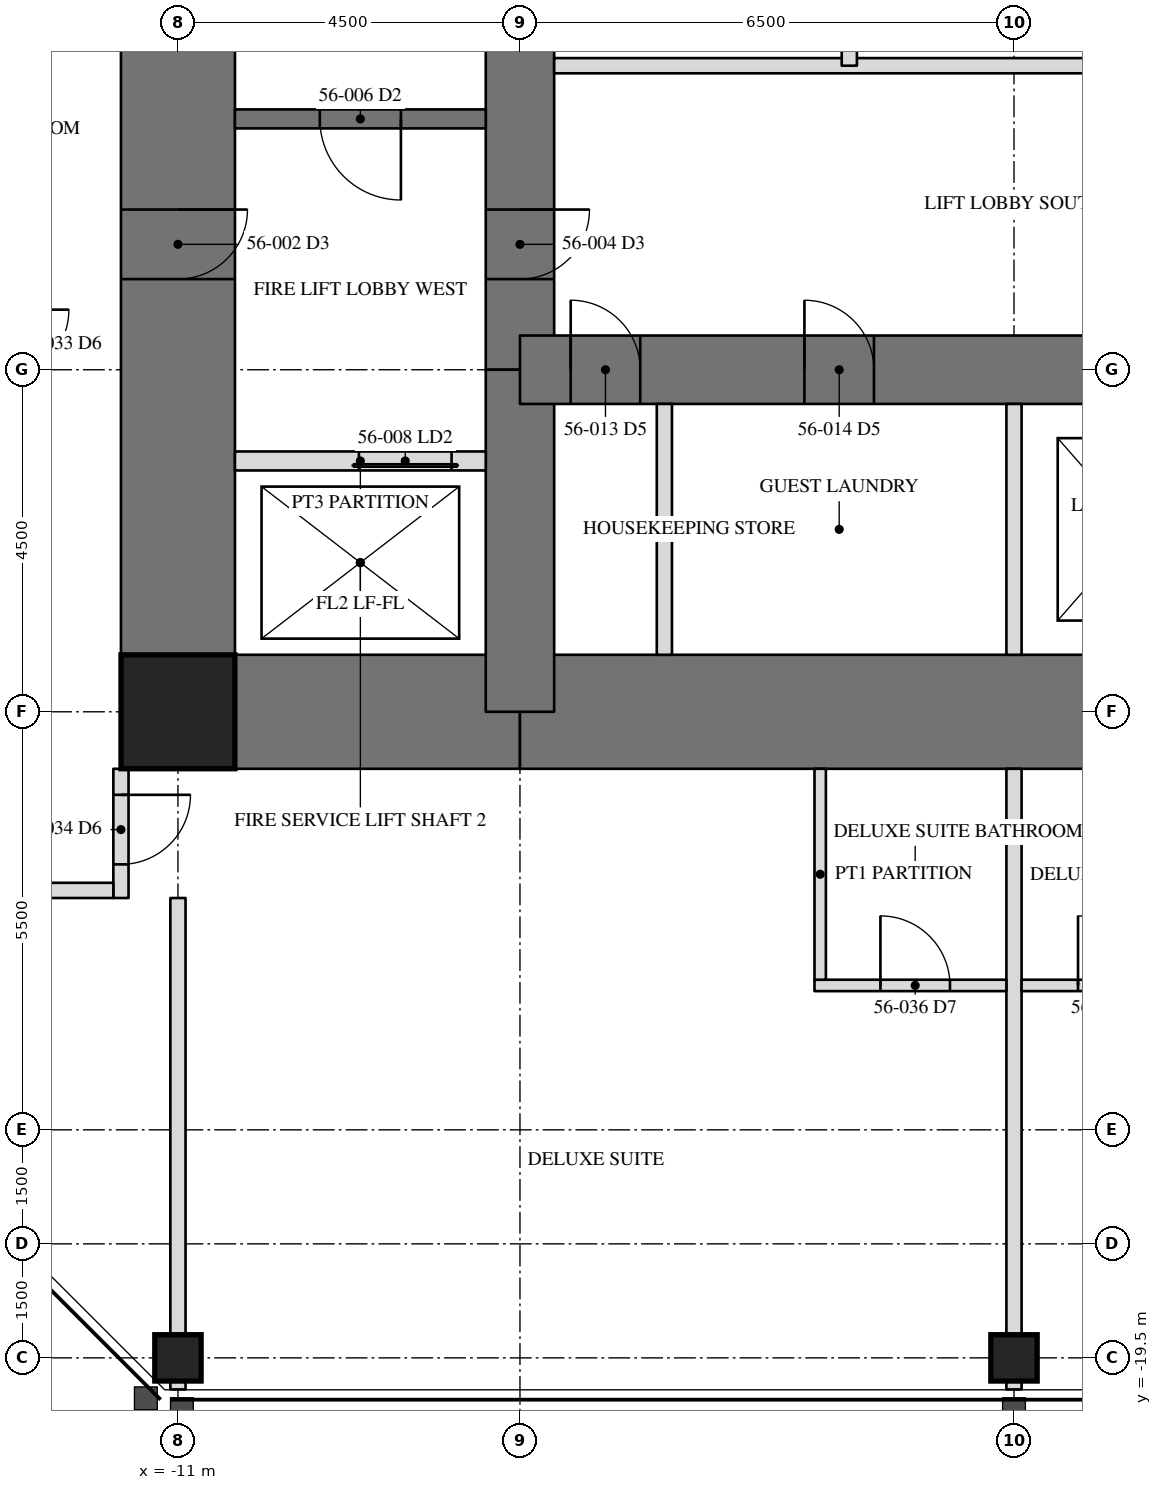
"""IFC4 building model, lengths in metres.
Left out: names, types, materials, properties, quantities, classifications, styles, units other than length and angle.
Written with IfcOpenShell. Run it as: python <this file> out.ifc"""

import sys

from ifc_helpers import new_model, si_unit, direction, frame, frame_2d, origin, origin_2d, place, context, subcontext, project, spatial, rectangle, hollow_rectangle, extrude, element, fill, save


model = new_model("IFC4")
c1 = context("Model", 3, precision=1e-05, world=origin(), true_north=direction((0.0, 1.0)))
c2 = subcontext(c1, "Body", "Model", "MODEL_VIEW")
j1 = project(units=[si_unit("LENGTHUNIT", "METRE"), si_unit("PLANEANGLEUNIT", "RADIAN")], contexts=[c1])
p1 = place(None, origin())
s1 = spatial("IfcSite", under=j1, at=p1, CompositionType="ELEMENT")
p2 = place(p1, origin())
s2 = spatial("IfcBuilding", under=s1, at=p2, CompositionType="ELEMENT")
p3 = place(p2, frame((0.0, 0.0, 232.7)))
s3 = spatial("IfcBuildingStorey", under=s2, at=p3, CompositionType="ELEMENT", Elevation=232.7)
for number, where, z_axis, x_axis in (
    (1, (-11.0, -19.5, 0.0), (0.0, 0.0, 1.0), (1.0, 0.0, 0.0)),
    (2, (0.0, -19.5, 0.0), (0.0, 0.0, 1.0), (1.0, 0.0, 0.0)),
):
    element("IfcColumn", number, at=place(p3, frame(where, z_axis=z_axis, x_axis=x_axis)), inside=s3, PredefinedType="COLUMN", context=c2, shape_type="SweptSolid", body=[
        extrude(hollow_rectangle(XDim=0.61, YDim=0.61, WallThickness=0.076, at=origin_2d()), origin(), (0.0, 0.0, 1.0), 3.5),
    ])
p4 = place(p3, frame((-11.0, 11.0, 0.0), z_axis=(0.0, 0.0, 1.0), x_axis=(0.0, -1.0, 0.0)))
e3 = element("IfcWall", 3, at=p4, inside=s3, PredefinedType="SHEAR", context=c2, shape_type="SweptSolid", body=[
    extrude(rectangle(XDim=22.0, YDim=1.5, at=frame_2d((11.0, 0.0))), origin(), (0.0, 0.0, 1.0), 3.5),
])
p5 = place(p4, frame((15.393, 0.0, 0.0)))
e4 = element("IfcOpeningElement", 4, at=p5, cuts=e3, PredefinedType="OPENING", context=c2, shape_type="SweptSolid", body=[
    extrude(rectangle(XDim=0.915, YDim=2.134, at=frame_2d((0.458, 1.067))), frame((0.0, 0.76, 0.0), z_axis=(0.0, -1.0, 0.0), x_axis=(1.0, 0.0, 0.0)), (0.0, 0.0, 1.0), 1.52),
])
p6 = place(p3, frame((-11.0, -11.0, 0.0), z_axis=(0.0, 0.0, 1.0), x_axis=(1.0, 0.0, 0.0)))
e5 = element("IfcWall", 5, at=p6, inside=s3, PredefinedType="SHEAR", context=c2, shape_type="SweptSolid", body=[
    extrude(rectangle(XDim=4.5, YDim=1.5, at=frame_2d((2.25, 0.0))), origin(), (0.0, 0.0, 1.0), 3.5),
])
p7 = place(p3, frame((-6.5, -11.0, 0.0), z_axis=(0.0, 0.0, 1.0), x_axis=(1.0, 0.0, 0.0)))
e6 = element("IfcWall", 6, at=p7, inside=s3, PredefinedType="SHEAR", context=c2, shape_type="SweptSolid", body=[
    extrude(rectangle(XDim=13.0, YDim=1.5, at=frame_2d((6.5, 0.0))), origin(), (0.0, 0.0, 1.0), 3.5),
])
p8 = place(p3, frame((-6.5, 6.5, 0.0), z_axis=(0.0, 0.0, 1.0), x_axis=(0.0, -1.0, 0.0)))
e7 = element("IfcWall", 7, at=p8, inside=s3, PredefinedType="SHEAR", context=c2, shape_type="SweptSolid", body=[
    extrude(rectangle(XDim=13.0, YDim=0.9, at=frame_2d((6.5, 0.0))), origin(), (0.0, 0.0, 1.0), 3.5),
])
p9 = place(p8, frame((10.893, 0.0, 0.0)))
e8 = element("IfcOpeningElement", 8, at=p9, cuts=e7, PredefinedType="OPENING", context=c2, shape_type="SweptSolid", body=[
    extrude(rectangle(XDim=0.915, YDim=2.134, at=frame_2d((0.458, 1.067))), frame((0.0, 0.46, 0.0), z_axis=(0.0, -1.0, 0.0), x_axis=(1.0, 0.0, 0.0)), (0.0, 0.0, 1.0), 0.92),
])
p10 = place(p8, frame((0.61, 0.0, 0.0)))
e9 = element("IfcOpeningElement", 9, at=p10, cuts=e7, PredefinedType="OPENING", context=c2, shape_type="SweptSolid", body=[
    extrude(rectangle(XDim=0.915, YDim=2.134, at=frame_2d((0.458, 1.067))), frame((0.0, 0.46, 0.0), z_axis=(0.0, -1.0, 0.0), x_axis=(1.0, 0.0, 0.0)), (0.0, 0.0, 1.0), 0.92),
])
p11 = place(p3, frame((-6.5, -6.5, 0.0), z_axis=(0.0, 0.0, 1.0), x_axis=(0.0, -1.0, 0.0)))
e10 = element("IfcWall", 10, at=p11, inside=s3, PredefinedType="SHEAR", context=c2, shape_type="SweptSolid", body=[
    extrude(rectangle(XDim=4.5, YDim=0.9, at=frame_2d((2.25, 0.0))), origin(), (0.0, 0.0, 1.0), 3.5),
])
p12 = place(p3, frame((-6.5, -6.5, 0.0), z_axis=(0.0, 0.0, 1.0), x_axis=(1.0, 0.0, 0.0)))
e11 = element("IfcWall", 11, at=p12, inside=s3, PredefinedType="SHEAR", context=c2, shape_type="SweptSolid", body=[
    extrude(rectangle(XDim=13.0, YDim=0.9, at=frame_2d((6.5, 0.0))), origin(), (0.0, 0.0, 1.0), 3.5),
])
p13 = place(p12, frame((7.592, 0.0, 0.0)))
e12 = element("IfcOpeningElement", 12, at=p13, cuts=e11, PredefinedType="OPENING", context=c2, shape_type="SweptSolid", body=[
    extrude(rectangle(XDim=1.067, YDim=2.134, at=frame_2d((0.533, 1.067))), frame((0.0, 0.46, 0.0), z_axis=(0.0, -1.0, 0.0), x_axis=(1.0, 0.0, 0.0)), (0.0, 0.0, 1.0), 0.92),
])
p14 = place(p12, frame((10.667, 0.0, 0.0)))
e13 = element("IfcOpeningElement", 13, at=p14, cuts=e11, PredefinedType="OPENING", context=c2, shape_type="SweptSolid", body=[
    extrude(rectangle(XDim=1.067, YDim=2.134, at=frame_2d((0.533, 1.067))), frame((0.0, 0.46, 0.0), z_axis=(0.0, -1.0, 0.0), x_axis=(1.0, 0.0, 0.0)), (0.0, 0.0, 1.0), 0.92),
])
p15 = place(p12, frame((0.667, 0.0, 0.0)))
e14 = element("IfcOpeningElement", 14, at=p15, cuts=e11, PredefinedType="OPENING", context=c2, shape_type="SweptSolid", body=[
    extrude(rectangle(XDim=0.915, YDim=2.134, at=frame_2d((0.458, 1.067))), frame((0.0, 0.46, 0.0), z_axis=(0.0, -1.0, 0.0), x_axis=(1.0, 0.0, 0.0)), (0.0, 0.0, 1.0), 0.92),
])
p16 = place(p12, frame((3.742, 0.0, 0.0)))
e15 = element("IfcOpeningElement", 15, at=p16, cuts=e11, PredefinedType="OPENING", context=c2, shape_type="SweptSolid", body=[
    extrude(rectangle(XDim=0.915, YDim=2.134, at=frame_2d((0.458, 1.067))), frame((0.0, 0.46, 0.0), z_axis=(0.0, -1.0, 0.0), x_axis=(1.0, 0.0, 0.0)), (0.0, 0.0, 1.0), 0.92),
])
p17 = place(p3, frame((-11.0, -11.0, 0.0), z_axis=(0.0, 0.0, 1.0), x_axis=(1.0, 0.0, 0.0)))
e16 = element("IfcColumn", 16, at=p17, inside=s3, PredefinedType="COLUMN", context=c2, shape_type="SweptSolid", body=[
    extrude(hollow_rectangle(XDim=1.499, YDim=1.499, WallThickness=0.102, at=origin_2d()), origin(), (0.0, 0.0, 1.0), 3.5),
])
p18 = place(p3, frame((-6.95, -3.2, 0.0), z_axis=(0.0, 0.0, 1.0), x_axis=(-1.0, 0.0, 0.0)))
e17 = element("IfcWall", 17, at=p18, inside=s3, PredefinedType="SOLIDWALL", context=c2, shape_type="SweptSolid", body=[
    extrude(rectangle(XDim=3.3, YDim=0.25, at=frame_2d((1.65, 0.0))), origin(), (0.0, 0.0, 1.0), 3.31),
])
p19 = place(p18, frame((1.116, 0.0, 0.0)))
e18 = element("IfcOpeningElement", 18, at=p19, cuts=e17, PredefinedType="OPENING", context=c2, shape_type="SweptSolid", body=[
    extrude(rectangle(XDim=1.067, YDim=2.134, at=frame_2d((0.533, 1.067))), frame((0.0, 0.135, 0.0), z_axis=(0.0, -1.0, 0.0), x_axis=(1.0, 0.0, 0.0)), (0.0, 0.0, 1.0), 0.27),
])
p20 = place(p3, frame((-6.95, -7.7, 0.0), z_axis=(0.0, 0.0, 1.0), x_axis=(-1.0, 0.0, 0.0)))
e19 = element("IfcWall", 19, at=p20, inside=s3, PredefinedType="PARTITIONING", context=c2, shape_type="SweptSolid", body=[
    extrude(rectangle(XDim=3.3, YDim=0.25, at=frame_2d((1.65, 0.0))), origin(), (0.0, 0.0, 1.0), 3.31),
])
p21 = place(p20, frame((0.45, 0.0, 0.0)))
e20 = element("IfcOpeningElement", 20, at=p21, cuts=e19, PredefinedType="OPENING", context=c2, shape_type="SweptSolid", body=[
    extrude(rectangle(XDim=1.219, YDim=2.134, at=frame_2d((0.609, 1.067))), frame((0.0, 0.135, 0.0), z_axis=(0.0, -1.0, 0.0), x_axis=(1.0, 0.0, 0.0)), (0.0, 0.0, 1.0), 0.27),
])
p22 = place(p3, frame((6.05, -2.5, 0.0), z_axis=(0.0, 0.0, 1.0), x_axis=(-1.0, 0.0, 0.0)))
e21 = element("IfcWall", 21, at=p22, inside=s3, PredefinedType="PARTITIONING", context=c2, shape_type="SweptSolid", body=[
    extrude(rectangle(XDim=12.1, YDim=0.2, at=frame_2d((6.05, 0.0))), origin(), (0.0, 0.0, 1.0), 3.31),
])
p23 = place(p3, frame((0.0, -10.25, 0.0), z_axis=(0.0, 0.0, 1.0), x_axis=(0.0, 1.0, 0.0)))
e22 = element("IfcWall", 22, at=p23, inside=s3, PredefinedType="PARTITIONING", context=c2, shape_type="SweptSolid", body=[
    extrude(rectangle(XDim=3.3, YDim=0.2, at=frame_2d((1.65, 0.0))), origin(), (0.0, 0.0, 1.0), 3.31),
])
p24 = place(p3, frame((-2.167, -2.5, 0.0), z_axis=(0.0, 0.0, 1.0), x_axis=(0.0, 1.0, 0.0)))
e23 = element("IfcWall", 23, at=p24, inside=s3, PredefinedType="PARTITIONING", context=c2, shape_type="SweptSolid", body=[
    extrude(rectangle(XDim=5.0, YDim=0.2, at=frame_2d((2.5, 0.0))), origin(), (0.0, 0.0, 1.0), 3.31),
])
p25 = place(p3, frame((-4.6, -10.25, 0.0), z_axis=(0.0, 0.0, 1.0), x_axis=(0.0, 1.0, 0.0)))
e24 = element("IfcWall", 24, at=p25, inside=s3, PredefinedType="PARTITIONING", context=c2, shape_type="SweptSolid", body=[
    extrude(rectangle(XDim=3.3, YDim=0.2, at=frame_2d((1.65, 0.0))), origin(), (0.0, 0.0, 1.0), 3.31),
])
p26 = place(p3, frame((-11.75, -11.75, 0.0), z_axis=(0.0, 0.0, 1.0), x_axis=(0.0, -1.0, 0.0)))
e25 = element("IfcWall", 25, at=p26, inside=s3, PredefinedType="PARTITIONING", context=c2, shape_type="SweptSolid", body=[
    extrude(rectangle(XDim=1.7, YDim=0.2, at=frame_2d((0.85, 0.0))), origin(), (0.0, 0.0, 1.0), 3.31),
])
p27 = place(p26, frame((0.343, 0.0, 0.0)))
e26 = element("IfcOpeningElement", 26, at=p27, cuts=e25, PredefinedType="OPENING", context=c2, shape_type="SweptSolid", body=[
    extrude(rectangle(XDim=0.915, YDim=2.134, at=frame_2d((0.458, 1.067))), frame((0.0, 0.11, 0.0), z_axis=(0.0, -1.0, 0.0), x_axis=(1.0, 0.0, 0.0)), (0.0, 0.0, 1.0), 0.22),
])
p28 = place(p3, frame((-13.45, -13.35, 0.0), z_axis=(0.0, 0.0, 1.0), x_axis=(1.0, 0.0, 0.0)))
e27 = element("IfcWall", 27, at=p28, inside=s3, PredefinedType="PARTITIONING", context=c2, shape_type="SweptSolid", body=[
    extrude(rectangle(XDim=1.6, YDim=0.2, at=frame_2d((0.8, 0.0))), origin(), (0.0, 0.0, 1.0), 3.31),
])
p29 = place(p3, frame((-11.0, -13.45, 0.0), z_axis=(0.0, 0.0, 1.0), x_axis=(0.0, -1.0, 0.0)))
e28 = element("IfcWall", 28, at=p29, inside=s3, PredefinedType="PARTITIONING", context=c2, shape_type="SweptSolid", body=[
    extrude(rectangle(XDim=6.465, YDim=0.2, at=frame_2d((3.232, 0.0))), origin(), (0.0, 0.0, 1.0), 2.802),
])
p30 = place(p3, frame((0.0, -11.75, 0.0), z_axis=(0.0, 0.0, 1.0), x_axis=(0.0, -1.0, 0.0)))
e29 = element("IfcWall", 29, at=p30, inside=s3, PredefinedType="PARTITIONING", context=c2, shape_type="SweptSolid", body=[
    extrude(rectangle(XDim=8.165, YDim=0.2, at=frame_2d((4.083, 0.0))), origin(), (0.0, 0.0, 1.0), 2.802),
])
p31 = place(p3, frame((-2.625, -14.6, 0.0), z_axis=(0.0, 0.0, 1.0), x_axis=(1.0, 0.0, 0.0)))
e30 = element("IfcWall", 30, at=p31, inside=s3, PredefinedType="PARTITIONING", context=c2, shape_type="SweptSolid", body=[
    extrude(rectangle(XDim=2.525, YDim=0.15, at=frame_2d((1.262, 0.0))), origin(), (0.0, 0.0, 1.0), 3.31),
])
p32 = place(p31, frame((0.867, 0.0, 0.0)))
e31 = element("IfcOpeningElement", 31, at=p32, cuts=e30, PredefinedType="OPENING", context=c2, shape_type="SweptSolid", body=[
    extrude(rectangle(XDim=0.915, YDim=2.032, at=frame_2d((0.458, 1.016))), frame((0.0, 0.085, 0.0), z_axis=(0.0, -1.0, 0.0), x_axis=(1.0, 0.0, 0.0)), (0.0, 0.0, 1.0), 0.17),
])
p33 = place(p3, frame((-2.55, -11.75, 0.0), z_axis=(0.0, 0.0, 1.0), x_axis=(0.0, -1.0, 0.0)))
e32 = element("IfcWall", 32, at=p33, inside=s3, PredefinedType="PARTITIONING", context=c2, shape_type="SweptSolid", body=[
    extrude(rectangle(XDim=2.775, YDim=0.15, at=frame_2d((1.387, 0.0))), origin(), (0.0, 0.0, 1.0), 3.31),
])
p34 = place(p3, frame((0.1, -14.6, 0.0), z_axis=(0.0, 0.0, 1.0), x_axis=(1.0, 0.0, 0.0)))
e33 = element("IfcWall", 33, at=p34, inside=s3, PredefinedType="PARTITIONING", context=c2, shape_type="SweptSolid", body=[
    extrude(rectangle(XDim=2.525, YDim=0.15, at=frame_2d((1.262, 0.0))), origin(), (0.0, 0.0, 1.0), 3.31),
])
p35 = place(p34, frame((0.742, 0.0, 0.0)))
e34 = element("IfcOpeningElement", 34, at=p35, cuts=e33, PredefinedType="OPENING", context=c2, shape_type="SweptSolid", body=[
    extrude(rectangle(XDim=0.915, YDim=2.032, at=frame_2d((0.458, 1.016))), frame((0.0, 0.085, 0.0), z_axis=(0.0, -1.0, 0.0), x_axis=(1.0, 0.0, 0.0)), (0.0, 0.0, 1.0), 0.17),
])
p36 = place(p5, origin())
e35 = element("IfcDoor", 35, at=p36, inside=s3, OperationType="SINGLE_SWING_RIGHT", PredefinedType="DOOR", context=c2, shape_type="SweptSolid", body=[
    extrude(rectangle(XDim=0.915, YDim=2.134, at=frame_2d((0.458, 1.067))), frame((0.0, -0.675, 0.0), z_axis=(0.0, -1.0, 0.0), x_axis=(1.0, 0.0, 0.0)), (0.0, 0.0, 1.0), 0.05),
])
fill(e4, e35)
p37 = place(p9, origin())
e36 = element("IfcDoor", 36, at=p37, inside=s3, OperationType="SINGLE_SWING_RIGHT", PredefinedType="DOOR", context=c2, shape_type="SweptSolid", body=[
    extrude(rectangle(XDim=0.915, YDim=2.134, at=frame_2d((0.458, 1.067))), frame((0.0, -0.375, 0.0), z_axis=(0.0, -1.0, 0.0), x_axis=(1.0, 0.0, 0.0)), (0.0, 0.0, 1.0), 0.05),
])
fill(e8, e36)
p38 = place(p19, origin())
e37 = element("IfcDoor", 37, at=p38, inside=s3, OperationType="SINGLE_SWING_LEFT", PredefinedType="DOOR", context=c2, shape_type="SweptSolid", body=[
    extrude(rectangle(XDim=1.067, YDim=2.134, at=frame_2d((0.533, 1.067))), frame((0.0, 0.025, 0.0), z_axis=(0.0, -1.0, 0.0), x_axis=(1.0, 0.0, 0.0)), (0.0, 0.0, 1.0), 0.05),
])
fill(e18, e37)
p39 = place(p21, origin())
e38 = element("IfcDoor", 38, at=p39, inside=s3, OperationType="SLIDING_TO_LEFT", PredefinedType="DOOR", context=c2, shape_type="SweptSolid", body=[
    extrude(rectangle(XDim=1.219, YDim=2.134, at=frame_2d((0.609, 1.067))), frame((0.0, 0.025, 0.0), z_axis=(0.0, -1.0, 0.0), x_axis=(1.0, 0.0, 0.0)), (0.0, 0.0, 1.0), 0.05),
])
fill(e20, e38)
p40 = place(p15, origin())
e39 = element("IfcDoor", 39, at=p40, inside=s3, OperationType="SINGLE_SWING_RIGHT", PredefinedType="DOOR", context=c2, shape_type="SweptSolid", body=[
    extrude(rectangle(XDim=0.915, YDim=2.134, at=frame_2d((0.458, 1.067))), frame((0.0, -0.375, 0.0), z_axis=(0.0, -1.0, 0.0), x_axis=(1.0, 0.0, 0.0)), (0.0, 0.0, 1.0), 0.05),
])
fill(e14, e39)
p41 = place(p16, origin())
e40 = element("IfcDoor", 40, at=p41, inside=s3, OperationType="SINGLE_SWING_RIGHT", PredefinedType="DOOR", context=c2, shape_type="SweptSolid", body=[
    extrude(rectangle(XDim=0.915, YDim=2.134, at=frame_2d((0.458, 1.067))), frame((0.0, -0.375, 0.0), z_axis=(0.0, -1.0, 0.0), x_axis=(1.0, 0.0, 0.0)), (0.0, 0.0, 1.0), 0.05),
])
fill(e15, e40)
p42 = place(p27, origin())
e41 = element("IfcDoor", 41, at=p42, inside=s3, OperationType="SINGLE_SWING_LEFT", PredefinedType="DOOR", context=c2, shape_type="SweptSolid", body=[
    extrude(rectangle(XDim=0.915, YDim=2.134, at=frame_2d((0.458, 1.067))), frame((0.0, 0.025, 0.0), z_axis=(0.0, -1.0, 0.0), x_axis=(1.0, 0.0, 0.0)), (0.0, 0.0, 1.0), 0.05),
])
fill(e26, e41)
p43 = place(p32, origin())
e42 = element("IfcDoor", 42, at=p43, inside=s3, OperationType="SINGLE_SWING_LEFT", PredefinedType="DOOR", context=c2, shape_type="SweptSolid", body=[
    extrude(rectangle(XDim=0.915, YDim=2.032, at=frame_2d((0.458, 1.016))), frame((0.0, 0.025, 0.0), z_axis=(0.0, -1.0, 0.0), x_axis=(1.0, 0.0, 0.0)), (0.0, 0.0, 1.0), 0.05),
])
fill(e31, e42)
p44 = place(p35, origin())
e43 = element("IfcDoor", 43, at=p44, inside=s3, OperationType="SINGLE_SWING_LEFT", PredefinedType="DOOR", context=c2, shape_type="SweptSolid", body=[
    extrude(rectangle(XDim=0.915, YDim=2.032, at=frame_2d((0.458, 1.016))), frame((0.0, 0.025, 0.0), z_axis=(0.0, -1.0, 0.0), x_axis=(1.0, 0.0, 0.0)), (0.0, 0.0, 1.0), 0.05),
])
fill(e34, e43)
save(model, sys.argv[1])
